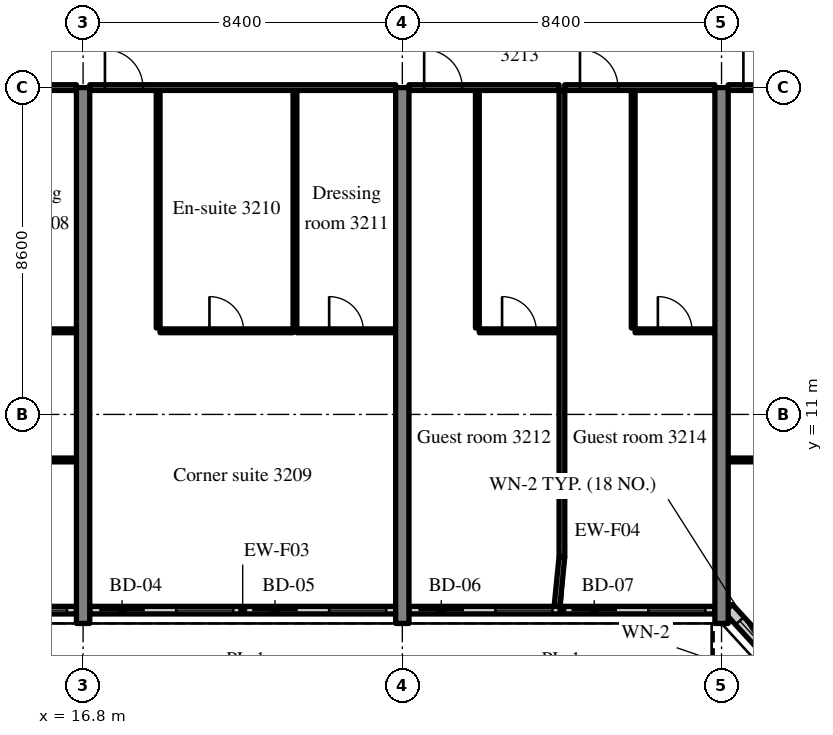
"""IFC4 building model, lengths in metres.
Left out: names, types, materials, properties, quantities, classifications, styles, units other than length and angle.
Written with IfcOpenShell. Run it as: python <this file> out.ifc"""

import sys

from ifc_helpers import new_model, si_unit, direction, frame, frame_2d, origin, place, context, subcontext, project, spatial, rectangle, extrude, source, transform, mapped, element, fill, save


model = new_model("IFC4")
c1 = context("Model", 3, precision=1e-05, world=origin(), true_north=direction((0.0, 1.0)))
c2 = subcontext(c1, "Body", "Model", "MODEL_VIEW")
j1 = project(units=[si_unit("LENGTHUNIT", "METRE"), si_unit("PLANEANGLEUNIT", "RADIAN")], contexts=[c1])
p1 = place(None, origin())
s1 = spatial("IfcSite", under=j1, at=p1, CompositionType="ELEMENT")
p2 = place(p1, origin())
s2 = spatial("IfcBuilding", under=s1, at=p2, CompositionType="ELEMENT")
p3 = place(p2, frame((0.0, 0.0, 133.2)))
s3 = spatial("IfcBuildingStorey", under=s2, at=p3, CompositionType="ELEMENT", Elevation=133.2)
m1 = source(origin(), c2, "Body", "SweptSolid", [
    extrude(rectangle(XDim=14.1, YDim=0.35, at=frame_2d((7.05, 0.0))), origin(), (0.0, 0.0, 1.0), 3.52),
])
for number, where, z_axis, x_axis in (
    (1, (16.8, 5.5, 0.0), (0.0, 0.0, 1.0), (0.0, 1.0, 0.0)),
    (2, (25.2, 5.5, 0.0), (0.0, 0.0, 1.0), (0.0, 1.0, 0.0)),
    (3, (33.6, 5.5, 0.0), (0.0, 0.0, 1.0), (0.0, 1.0, 0.0)),
):
    element("IfcWall", number, at=place(p3, frame(where, z_axis=z_axis, x_axis=x_axis)), inside=s3, PredefinedType="SHEAR", context=c2, shape_type="MappedRepresentation", body=[
        mapped(m1, transform((0.0, 0.0, 0.0), scale=1.0)),
    ])
m2 = source(origin(), c2, "Body", "SweptSolid", [
    extrude(rectangle(XDim=8.05, YDim=0.2, at=frame_2d((4.025, 0.0))), origin(), (0.0, 0.0, 1.0), 2.82),
])
p4 = place(p3, frame((8.575, 5.85, 0.0), z_axis=(0.0, 0.0, 1.0), x_axis=(1.0, 0.0, 0.0)))
e4 = element("IfcWall", 4, at=p4, inside=s3, PredefinedType="SOLIDWALL", context=c2, shape_type="MappedRepresentation", body=[
    mapped(m2, transform((0.0, 0.0, 0.0), scale=1.0)),
])
m3 = source(origin(), c2, "Body", "SweptSolid", [
    extrude(rectangle(XDim=1.2, YDim=2.4, at=frame_2d((0.6, 1.2))), frame((0.0, 0.11, 0.0), z_axis=(0.0, -1.0, 0.0), x_axis=(1.0, 0.0, 0.0)), (0.0, 0.0, 1.0), 0.22),
])
p5 = place(p4, frame((0.25, 0.0, 0.0)))
e5 = element("IfcOpeningElement", 5, at=p5, cuts=e4, PredefinedType="OPENING", context=c2, shape_type="MappedRepresentation", body=[
    mapped(m3, transform((0.0, 0.0, 0.0), scale=1.0)),
])
m4 = source(origin(), c2, "Body", "SweptSolid", [
    extrude(rectangle(XDim=1.5, YDim=1.5, at=frame_2d((0.75, 0.75))), frame((0.0, 0.11, 0.0), z_axis=(0.0, -1.0, 0.0), x_axis=(1.0, 0.0, 0.0)), (0.0, 0.0, 1.0), 0.22),
])
p6 = place(p4, frame((2.275, 0.0, 0.9)))
e6 = element("IfcOpeningElement", 6, at=p6, cuts=e4, PredefinedType="OPENING", context=c2, shape_type="MappedRepresentation", body=[
    mapped(m4, transform((0.0, 0.0, 0.0), scale=1.0)),
])
p7 = place(p4, frame((4.275, 0.0, 0.0)))
e7 = element("IfcOpeningElement", 7, at=p7, cuts=e4, PredefinedType="OPENING", context=c2, shape_type="MappedRepresentation", body=[
    mapped(m3, transform((0.0, 0.0, 0.0), scale=1.0)),
])
p8 = place(p4, frame((6.3, 0.0, 0.9)))
e8 = element("IfcOpeningElement", 8, at=p8, cuts=e4, PredefinedType="OPENING", context=c2, shape_type="MappedRepresentation", body=[
    mapped(m4, transform((0.0, 0.0, 0.0), scale=1.0)),
])
m5 = source(origin(), c2, "Body", "SweptSolid", [
    extrude(rectangle(XDim=8.05, YDim=0.2, at=frame_2d((4.025, 0.0))), origin(), (0.0, 0.0, 1.0), 2.82),
])
p9 = place(p3, frame((16.975, 5.85, 0.0), z_axis=(0.0, 0.0, 1.0), x_axis=(1.0, 0.0, 0.0)))
e9 = element("IfcWall", 9, at=p9, inside=s3, PredefinedType="SOLIDWALL", context=c2, shape_type="MappedRepresentation", body=[
    mapped(m5, transform((0.0, 0.0, 0.0), scale=1.0)),
])
p10 = place(p9, frame((0.25, 0.0, 0.0)))
e10 = element("IfcOpeningElement", 10, at=p10, cuts=e9, PredefinedType="OPENING", context=c2, shape_type="MappedRepresentation", body=[
    mapped(m3, transform((0.0, 0.0, 0.0), scale=1.0)),
])
p11 = place(p9, frame((2.275, 0.0, 0.9)))
e11 = element("IfcOpeningElement", 11, at=p11, cuts=e9, PredefinedType="OPENING", context=c2, shape_type="MappedRepresentation", body=[
    mapped(m4, transform((0.0, 0.0, 0.0), scale=1.0)),
])
p12 = place(p9, frame((4.275, 0.0, 0.0)))
e12 = element("IfcOpeningElement", 12, at=p12, cuts=e9, PredefinedType="OPENING", context=c2, shape_type="MappedRepresentation", body=[
    mapped(m3, transform((0.0, 0.0, 0.0), scale=1.0)),
])
p13 = place(p9, frame((6.3, 0.0, 0.9)))
e13 = element("IfcOpeningElement", 13, at=p13, cuts=e9, PredefinedType="OPENING", context=c2, shape_type="MappedRepresentation", body=[
    mapped(m4, transform((0.0, 0.0, 0.0), scale=1.0)),
])
p14 = place(p3, frame((25.375, 5.85, 0.0), z_axis=(0.0, 0.0, 1.0), x_axis=(1.0, 0.0, 0.0)))
e14 = element("IfcWall", 14, at=p14, inside=s3, PredefinedType="SOLIDWALL", context=c2, shape_type="MappedRepresentation", body=[
    mapped(m2, transform((0.0, 0.0, 0.0), scale=1.0)),
])
p15 = place(p14, frame((0.25, 0.0, 0.0)))
e15 = element("IfcOpeningElement", 15, at=p15, cuts=e14, PredefinedType="OPENING", context=c2, shape_type="MappedRepresentation", body=[
    mapped(m3, transform((0.0, 0.0, 0.0), scale=1.0)),
])
p16 = place(p14, frame((2.275, 0.0, 0.9)))
e16 = element("IfcOpeningElement", 16, at=p16, cuts=e14, PredefinedType="OPENING", context=c2, shape_type="MappedRepresentation", body=[
    mapped(m4, transform((0.0, 0.0, 0.0), scale=1.0)),
])
p17 = place(p14, frame((4.275, 0.0, 0.0)))
e17 = element("IfcOpeningElement", 17, at=p17, cuts=e14, PredefinedType="OPENING", context=c2, shape_type="MappedRepresentation", body=[
    mapped(m3, transform((0.0, 0.0, 0.0), scale=1.0)),
])
p18 = place(p14, frame((6.3, 0.0, 0.9)))
e18 = element("IfcOpeningElement", 18, at=p18, cuts=e14, PredefinedType="OPENING", context=c2, shape_type="MappedRepresentation", body=[
    mapped(m4, transform((0.0, 0.0, 0.0), scale=1.0)),
])
m6 = source(origin(), c2, "Body", "SweptSolid", [
    extrude(rectangle(XDim=2.398, YDim=0.3, at=frame_2d((1.199, 0.0))), origin(), (0.0, 0.0, 1.0), 3.52),
])
p19 = place(p3, frame((33.776, 5.9, 0.0), z_axis=(0.0, 0.0, 1.0), x_axis=(0.675374189419, -0.737475222815, 0.0)))
e19 = element("IfcWall", 19, at=p19, inside=s3, PredefinedType="SOLIDWALL", context=c2, shape_type="MappedRepresentation", body=[
    mapped(m6, transform((0.0, 0.0, 0.0), scale=1.0)),
])
m7 = source(origin(), c2, "Body", "SweptSolid", [
    extrude(rectangle(XDim=1.5, YDim=2.0, at=frame_2d((0.75, 1.0))), frame((0.0, 0.16, 0.0), z_axis=(0.0, -1.0, 0.0), x_axis=(1.0, 0.0, 0.0)), (0.0, 0.0, 1.0), 0.32),
])
p20 = place(p19, frame((0.449, 0.0, 0.9)))
e20 = element("IfcOpeningElement", 20, at=p20, cuts=e19, PredefinedType="OPENING", context=c2, shape_type="MappedRepresentation", body=[
    mapped(m7, transform((0.0, 0.0, 0.0), scale=1.0)),
])
m8 = source(origin(), c2, "Body", "SweptSolid", [
    extrude(rectangle(XDim=2.6, YDim=0.1, at=frame_2d((1.3, 0.0))), origin(), (0.0, 0.0, 1.0), 3.52),
])
p21 = place(p3, frame((14.025, 13.2, 0.0), z_axis=(0.0, 0.0, 1.0), x_axis=(1.0, 0.0, 0.0)))
e21 = element("IfcWall", 21, at=p21, inside=s3, PredefinedType="PARTITIONING", context=c2, shape_type="MappedRepresentation", body=[
    mapped(m8, transform((0.0, 0.0, 0.0), scale=1.0)),
])
m9 = source(origin(), c2, "Body", "SweptSolid", [
    extrude(rectangle(XDim=0.9, YDim=2.1, at=frame_2d((0.45, 1.05))), frame((0.0, 0.06, 0.0), z_axis=(0.0, -1.0, 0.0), x_axis=(1.0, 0.0, 0.0)), (0.0, 0.0, 1.0), 0.12),
])
p22 = place(p21, frame((0.85, 0.0, 0.0)))
e22 = element("IfcOpeningElement", 22, at=p22, cuts=e21, PredefinedType="OPENING", context=c2, shape_type="MappedRepresentation", body=[
    mapped(m9, transform((0.0, 0.0, 0.0), scale=1.0)),
])
m10 = source(origin(), c2, "Body", "SweptSolid", [
    extrude(rectangle(XDim=8.05, YDim=0.1, at=frame_2d((4.025, 0.0))), origin(), (0.0, 0.0, 1.0), 3.52),
])
p23 = place(p3, frame((8.575, 9.802, 0.0), z_axis=(0.0, 0.0, 1.0), x_axis=(1.0, 0.0, 0.0)))
e23 = element("IfcWall", 23, at=p23, inside=s3, PredefinedType="PARTITIONING", context=c2, shape_type="MappedRepresentation", body=[
    mapped(m10, transform((0.0, 0.0, 0.0), scale=1.0)),
])
m11 = source(origin(), c2, "Body", "SweptSolid", [
    extrude(rectangle(XDim=1.8, YDim=2.1, at=frame_2d((0.9, 1.05))), frame((0.0, 0.06, 0.0), z_axis=(0.0, -1.0, 0.0), x_axis=(1.0, 0.0, 0.0)), (0.0, 0.0, 1.0), 0.12),
])
p24 = place(p23, frame((3.125, 0.0, 0.0)))
e24 = element("IfcOpeningElement", 24, at=p24, cuts=e23, PredefinedType="OPENING", context=c2, shape_type="MappedRepresentation", body=[
    mapped(m11, transform((0.0, 0.0, 0.0), scale=1.0)),
])
m12 = source(origin(), c2, "Body", "SweptSolid", [
    extrude(rectangle(XDim=8.05, YDim=0.15, at=frame_2d((4.025, 0.0))), origin(), (0.0, 0.0, 1.0), 2.82),
])
p25 = place(p3, frame((8.575, 19.6, 0.0), z_axis=(0.0, 0.0, 1.0), x_axis=(1.0, 0.0, 0.0)))
e25 = element("IfcWall", 25, at=p25, inside=s3, PredefinedType="PARTITIONING", context=c2, shape_type="MappedRepresentation", body=[
    mapped(m12, transform((0.0, 0.0, 0.0), scale=1.0)),
])
m13 = source(origin(), c2, "Body", "SweptSolid", [
    extrude(rectangle(XDim=1.0, YDim=2.1, at=frame_2d((0.5, 1.05))), frame((0.0, 0.085, 0.0), z_axis=(0.0, -1.0, 0.0), x_axis=(1.0, 0.0, 0.0)), (0.0, 0.0, 1.0), 0.17),
])
p26 = place(p25, frame((0.4, 0.0, 0.0)))
e26 = element("IfcOpeningElement", 26, at=p26, cuts=e25, PredefinedType="OPENING", context=c2, shape_type="MappedRepresentation", body=[
    mapped(m13, transform((0.0, 0.0, 0.0), scale=1.0)),
])
m14 = source(origin(), c2, "Body", "SweptSolid", [
    extrude(rectangle(XDim=6.25, YDim=0.1, at=frame_2d((3.125, 0.0))), origin(), (0.0, 0.0, 1.0), 3.52),
])
for number, where, z_axis, x_axis in (
    (27, (18.775, 13.275, 0.0), (0.0, 0.0, 1.0), (0.0, 1.0, 0.0)),
    (28, (22.375, 13.275, 0.0), (0.0, 0.0, 1.0), (0.0, 1.0, 0.0)),
):
    element("IfcWall", number, at=place(p3, frame(where, z_axis=z_axis, x_axis=x_axis)), inside=s3, PredefinedType="PARTITIONING", context=c2, shape_type="MappedRepresentation", body=[
        mapped(m14, transform((0.0, 0.0, 0.0), scale=1.0)),
    ])
m15 = source(origin(), c2, "Body", "SweptSolid", [
    extrude(rectangle(XDim=3.5, YDim=0.1, at=frame_2d((1.75, 0.0))), origin(), (0.0, 0.0, 1.0), 3.52),
])
p27 = place(p3, frame((18.825, 13.2, 0.0), z_axis=(0.0, 0.0, 1.0), x_axis=(1.0, 0.0, 0.0)))
e29 = element("IfcWall", 29, at=p27, inside=s3, PredefinedType="PARTITIONING", context=c2, shape_type="MappedRepresentation", body=[
    mapped(m15, transform((0.0, 0.0, 0.0), scale=1.0)),
])
p28 = place(p27, frame((1.3, 0.0, 0.0)))
e30 = element("IfcOpeningElement", 30, at=p28, cuts=e29, PredefinedType="OPENING", context=c2, shape_type="MappedRepresentation", body=[
    mapped(m9, transform((0.0, 0.0, 0.0), scale=1.0)),
])
m16 = source(origin(), c2, "Body", "SweptSolid", [
    extrude(rectangle(XDim=2.6, YDim=0.1, at=frame_2d((1.3, 0.0))), origin(), (0.0, 0.0, 1.0), 3.52),
])
p29 = place(p3, frame((22.425, 13.2, 0.0), z_axis=(0.0, 0.0, 1.0), x_axis=(1.0, 0.0, 0.0)))
e31 = element("IfcWall", 31, at=p29, inside=s3, PredefinedType="PARTITIONING", context=c2, shape_type="MappedRepresentation", body=[
    mapped(m16, transform((0.0, 0.0, 0.0), scale=1.0)),
])
p30 = place(p29, frame((0.85, 0.0, 0.0)))
e32 = element("IfcOpeningElement", 32, at=p30, cuts=e31, PredefinedType="OPENING", context=c2, shape_type="MappedRepresentation", body=[
    mapped(m9, transform((0.0, 0.0, 0.0), scale=1.0)),
])
m17 = source(origin(), c2, "Body", "SweptSolid", [
    extrude(rectangle(XDim=8.05, YDim=0.15, at=frame_2d((4.025, 0.0))), origin(), (0.0, 0.0, 1.0), 2.82),
])
p31 = place(p3, frame((16.975, 19.6, 0.0), z_axis=(0.0, 0.0, 1.0), x_axis=(1.0, 0.0, 0.0)))
e33 = element("IfcWall", 33, at=p31, inside=s3, PredefinedType="PARTITIONING", context=c2, shape_type="MappedRepresentation", body=[
    mapped(m17, transform((0.0, 0.0, 0.0), scale=1.0)),
])
p32 = place(p31, frame((0.4, 0.0, 0.0)))
e34 = element("IfcOpeningElement", 34, at=p32, cuts=e33, PredefinedType="OPENING", context=c2, shape_type="MappedRepresentation", body=[
    mapped(m13, transform((0.0, 0.0, 0.0), scale=1.0)),
])
p33 = place(p3, frame((27.175, 13.275, 0.0), z_axis=(0.0, 0.0, 1.0), x_axis=(0.0, 1.0, 0.0)))
e35 = element("IfcWall", 35, at=p33, inside=s3, PredefinedType="PARTITIONING", context=c2, shape_type="MappedRepresentation", body=[
    mapped(m14, transform((0.0, 0.0, 0.0), scale=1.0)),
])
m18 = source(origin(), c2, "Body", "SweptSolid", [
    extrude(rectangle(XDim=2.1, YDim=0.1, at=frame_2d((1.05, 0.0))), origin(), (0.0, 0.0, 1.0), 3.52),
])
p34 = place(p3, frame((27.225, 13.2, 0.0), z_axis=(0.0, 0.0, 1.0), x_axis=(1.0, 0.0, 0.0)))
e36 = element("IfcWall", 36, at=p34, inside=s3, PredefinedType="PARTITIONING", context=c2, shape_type="MappedRepresentation", body=[
    mapped(m18, transform((0.0, 0.0, 0.0), scale=1.0)),
])
p35 = place(p34, frame((0.6, 0.0, 0.0)))
e37 = element("IfcOpeningElement", 37, at=p35, cuts=e36, PredefinedType="OPENING", context=c2, shape_type="MappedRepresentation", body=[
    mapped(m9, transform((0.0, 0.0, 0.0), scale=1.0)),
])
m19 = source(origin(), c2, "Body", "SweptSolid", [
    extrude(rectangle(XDim=3.95, YDim=0.15, at=frame_2d((1.975, 0.0))), origin(), (0.0, 0.0, 1.0), 2.82),
])
p36 = place(p3, frame((25.375, 19.6, 0.0), z_axis=(0.0, 0.0, 1.0), x_axis=(1.0, 0.0, 0.0)))
e38 = element("IfcWall", 38, at=p36, inside=s3, PredefinedType="PARTITIONING", context=c2, shape_type="MappedRepresentation", body=[
    mapped(m19, transform((0.0, 0.0, 0.0), scale=1.0)),
])
p37 = place(p36, frame((0.4, 0.0, 0.0)))
e39 = element("IfcOpeningElement", 39, at=p37, cuts=e38, PredefinedType="OPENING", context=c2, shape_type="MappedRepresentation", body=[
    mapped(m13, transform((0.0, 0.0, 0.0), scale=1.0)),
])
p38 = place(p3, frame((31.275, 13.275, 0.0), z_axis=(0.0, 0.0, 1.0), x_axis=(0.0, 1.0, 0.0)))
e40 = element("IfcWall", 40, at=p38, inside=s3, PredefinedType="PARTITIONING", context=c2, shape_type="MappedRepresentation", body=[
    mapped(m14, transform((0.0, 0.0, 0.0), scale=1.0)),
])
m20 = source(origin(), c2, "Body", "SweptSolid", [
    extrude(rectangle(XDim=2.1, YDim=0.1, at=frame_2d((1.05, 0.0))), origin(), (0.0, 0.0, 1.0), 3.52),
])
p39 = place(p3, frame((31.325, 13.2, 0.0), z_axis=(0.0, 0.0, 1.0), x_axis=(1.0, 0.0, 0.0)))
e41 = element("IfcWall", 41, at=p39, inside=s3, PredefinedType="PARTITIONING", context=c2, shape_type="MappedRepresentation", body=[
    mapped(m20, transform((0.0, 0.0, 0.0), scale=1.0)),
])
p40 = place(p39, frame((0.6, 0.0, 0.0)))
e42 = element("IfcOpeningElement", 42, at=p40, cuts=e41, PredefinedType="OPENING", context=c2, shape_type="MappedRepresentation", body=[
    mapped(m9, transform((0.0, 0.0, 0.0), scale=1.0)),
])
p41 = place(p3, frame((29.475, 19.6, 0.0), z_axis=(0.0, 0.0, 1.0), x_axis=(1.0, 0.0, 0.0)))
e43 = element("IfcWall", 43, at=p41, inside=s3, PredefinedType="PARTITIONING", context=c2, shape_type="MappedRepresentation", body=[
    mapped(m19, transform((0.0, 0.0, 0.0), scale=1.0)),
])
p42 = place(p41, frame((0.4, 0.0, 0.0)))
e44 = element("IfcOpeningElement", 44, at=p42, cuts=e43, PredefinedType="OPENING", context=c2, shape_type="MappedRepresentation", body=[
    mapped(m13, transform((0.0, 0.0, 0.0), scale=1.0)),
])
m21 = source(origin(), c2, "Body", "SweptSolid", [
    extrude(rectangle(XDim=12.275, YDim=0.15, at=frame_2d((6.137, 0.0))), origin(), (0.0, 0.0, 1.0), 3.52),
])
p43 = place(p3, frame((29.4, 7.25, 0.0), z_axis=(0.0, 0.0, 1.0), x_axis=(0.0, 1.0, 0.0)))
e45 = element("IfcWall", 45, at=p43, inside=s3, PredefinedType="PARTITIONING", context=c2, shape_type="MappedRepresentation", body=[
    mapped(m21, transform((0.0, 0.0, 0.0), scale=1.0)),
])
p44 = place(p3, frame((33.775, 9.802, 0.0), z_axis=(0.0, 0.0, 1.0), x_axis=(1.0, 0.0, 0.0)))
e46 = element("IfcWall", 46, at=p44, inside=s3, PredefinedType="PARTITIONING", context=c2, shape_type="MappedRepresentation", body=[
    mapped(m10, transform((0.0, 0.0, 0.0), scale=1.0)),
])
p45 = place(p44, frame((3.125, 0.0, 0.0)))
e47 = element("IfcOpeningElement", 47, at=p45, cuts=e46, PredefinedType="OPENING", context=c2, shape_type="MappedRepresentation", body=[
    mapped(m11, transform((0.0, 0.0, 0.0), scale=1.0)),
])
p46 = place(p3, frame((33.775, 19.6, 0.0), z_axis=(0.0, 0.0, 1.0), x_axis=(1.0, 0.0, 0.0)))
e48 = element("IfcWall", 48, at=p46, inside=s3, PredefinedType="PARTITIONING", context=c2, shape_type="MappedRepresentation", body=[
    mapped(m12, transform((0.0, 0.0, 0.0), scale=1.0)),
])
p47 = place(p46, frame((0.4, 0.0, 0.0)))
e49 = element("IfcOpeningElement", 49, at=p47, cuts=e48, PredefinedType="OPENING", context=c2, shape_type="MappedRepresentation", body=[
    mapped(m13, transform((0.0, 0.0, 0.0), scale=1.0)),
])
m22 = source(origin(), c2, "Body", "SweptSolid", [
    extrude(rectangle(XDim=1.307, YDim=0.15, at=frame_2d((0.653, 0.0))), origin(), (0.0, 0.0, 1.0), 3.52),
])
p48 = place(p3, frame((29.27, 5.95, 0.0), z_axis=(0.0, 0.0, 1.0), x_axis=(0.099411212066, 0.995046436562, 0.0)))
e50 = element("IfcWall", 50, at=p48, inside=s3, PredefinedType="PARTITIONING", context=c2, shape_type="MappedRepresentation", body=[
    mapped(m22, transform((0.0, 0.0, 0.0), scale=1.0)),
])
m23 = source(origin(), c2, "Body", "SweptSolid", [
    extrude(rectangle(XDim=1.5, YDim=1.5, at=frame_2d((0.75, 0.75))), frame((0.0, 0.03, 0.0), z_axis=(0.0, -1.0, 0.0), x_axis=(1.0, 0.0, 0.0)), (0.0, 0.0, 1.0), 0.06),
])
p49 = place(p8, origin())
e51 = element("IfcWindow", 51, at=p49, inside=s3, PartitioningType="SINGLE_PANEL", PredefinedType="WINDOW", context=c2, shape_type="MappedRepresentation", body=[
    mapped(m23, transform((0.0, 0.0, 0.0), scale=1.0)),
])
fill(e8, e51)
m24 = source(origin(), c2, "Body", "SweptSolid", [
    extrude(rectangle(XDim=1.2, YDim=2.4, at=frame_2d((0.6, 1.2))), frame((0.0, 0.025, 0.0), z_axis=(0.0, -1.0, 0.0), x_axis=(1.0, 0.0, 0.0)), (0.0, 0.0, 1.0), 0.05),
])
p50 = place(p10, origin())
e52 = element("IfcDoor", 52, at=p50, inside=s3, OperationType="SLIDING_TO_RIGHT", PredefinedType="DOOR", context=c2, shape_type="MappedRepresentation", body=[
    mapped(m24, transform((0.0, 0.0, 0.0), scale=1.0)),
])
fill(e10, e52)
p51 = place(p11, origin())
e53 = element("IfcWindow", 53, at=p51, inside=s3, PartitioningType="SINGLE_PANEL", PredefinedType="WINDOW", context=c2, shape_type="MappedRepresentation", body=[
    mapped(m23, transform((0.0, 0.0, 0.0), scale=1.0)),
])
fill(e11, e53)
p52 = place(p12, origin())
e54 = element("IfcDoor", 54, at=p52, inside=s3, OperationType="SLIDING_TO_LEFT", PredefinedType="DOOR", context=c2, shape_type="MappedRepresentation", body=[
    mapped(m24, transform((0.0, 0.0, 0.0), scale=1.0)),
])
fill(e12, e54)
p53 = place(p13, origin())
e55 = element("IfcWindow", 55, at=p53, inside=s3, PartitioningType="SINGLE_PANEL", PredefinedType="WINDOW", context=c2, shape_type="MappedRepresentation", body=[
    mapped(m23, transform((0.0, 0.0, 0.0), scale=1.0)),
])
fill(e13, e55)
p54 = place(p15, origin())
e56 = element("IfcDoor", 56, at=p54, inside=s3, OperationType="SLIDING_TO_RIGHT", PredefinedType="DOOR", context=c2, shape_type="MappedRepresentation", body=[
    mapped(m24, transform((0.0, 0.0, 0.0), scale=1.0)),
])
fill(e15, e56)
p55 = place(p16, origin())
e57 = element("IfcWindow", 57, at=p55, inside=s3, PartitioningType="SINGLE_PANEL", PredefinedType="WINDOW", context=c2, shape_type="MappedRepresentation", body=[
    mapped(m23, transform((0.0, 0.0, 0.0), scale=1.0)),
])
fill(e16, e57)
p56 = place(p17, origin())
e58 = element("IfcDoor", 58, at=p56, inside=s3, OperationType="SLIDING_TO_LEFT", PredefinedType="DOOR", context=c2, shape_type="MappedRepresentation", body=[
    mapped(m24, transform((0.0, 0.0, 0.0), scale=1.0)),
])
fill(e17, e58)
p57 = place(p18, origin())
e59 = element("IfcWindow", 59, at=p57, inside=s3, PartitioningType="SINGLE_PANEL", PredefinedType="WINDOW", context=c2, shape_type="MappedRepresentation", body=[
    mapped(m23, transform((0.0, 0.0, 0.0), scale=1.0)),
])
fill(e18, e59)
m25 = source(origin(), c2, "Body", "SweptSolid", [
    extrude(rectangle(XDim=1.5, YDim=2.0, at=frame_2d((0.75, 1.0))), frame((0.0, 0.03, 0.0), z_axis=(0.0, -1.0, 0.0), x_axis=(1.0, 0.0, 0.0)), (0.0, 0.0, 1.0), 0.06),
])
p58 = place(p20, origin())
e60 = element("IfcWindow", 60, at=p58, inside=s3, PartitioningType="SINGLE_PANEL", PredefinedType="WINDOW", context=c2, shape_type="MappedRepresentation", body=[
    mapped(m25, transform((0.0, 0.0, 0.0), scale=1.0)),
])
fill(e20, e60)
m26 = source(origin(), c2, "Body", "SweptSolid", [
    extrude(rectangle(XDim=0.9, YDim=2.1, at=frame_2d((0.45, 1.05))), frame((0.0, 0.025, 0.0), z_axis=(0.0, -1.0, 0.0), x_axis=(1.0, 0.0, 0.0)), (0.0, 0.0, 1.0), 0.05),
])
p59 = place(p28, origin())
e61 = element("IfcDoor", 61, at=p59, inside=s3, OperationType="SINGLE_SWING_LEFT", PredefinedType="DOOR", context=c2, shape_type="MappedRepresentation", body=[
    mapped(m26, transform((0.0, 0.0, 0.0), scale=1.0)),
])
fill(e30, e61)
p60 = place(p30, origin())
e62 = element("IfcDoor", 62, at=p60, inside=s3, OperationType="SINGLE_SWING_LEFT", PredefinedType="DOOR", context=c2, shape_type="MappedRepresentation", body=[
    mapped(m26, transform((0.0, 0.0, 0.0), scale=1.0)),
])
fill(e32, e62)
m27 = source(origin(), c2, "Body", "SweptSolid", [
    extrude(rectangle(XDim=1.0, YDim=2.1, at=frame_2d((0.5, 1.05))), frame((0.0, 0.025, 0.0), z_axis=(0.0, -1.0, 0.0), x_axis=(1.0, 0.0, 0.0)), (0.0, 0.0, 1.0), 0.05),
])
p61 = place(p32, origin())
e63 = element("IfcDoor", 63, at=p61, inside=s3, OperationType="SINGLE_SWING_LEFT", PredefinedType="DOOR", context=c2, shape_type="MappedRepresentation", body=[
    mapped(m27, transform((0.0, 0.0, 0.0), scale=1.0)),
])
fill(e34, e63)
p62 = place(p35, origin())
e64 = element("IfcDoor", 64, at=p62, inside=s3, OperationType="SINGLE_SWING_LEFT", PredefinedType="DOOR", context=c2, shape_type="MappedRepresentation", body=[
    mapped(m26, transform((0.0, 0.0, 0.0), scale=1.0)),
])
fill(e37, e64)
p63 = place(p37, origin())
e65 = element("IfcDoor", 65, at=p63, inside=s3, OperationType="SINGLE_SWING_LEFT", PredefinedType="DOOR", context=c2, shape_type="MappedRepresentation", body=[
    mapped(m27, transform((0.0, 0.0, 0.0), scale=1.0)),
])
fill(e39, e65)
p64 = place(p40, origin())
e66 = element("IfcDoor", 66, at=p64, inside=s3, OperationType="SINGLE_SWING_LEFT", PredefinedType="DOOR", context=c2, shape_type="MappedRepresentation", body=[
    mapped(m26, transform((0.0, 0.0, 0.0), scale=1.0)),
])
fill(e42, e66)
p65 = place(p42, origin())
e67 = element("IfcDoor", 67, at=p65, inside=s3, OperationType="SINGLE_SWING_LEFT", PredefinedType="DOOR", context=c2, shape_type="MappedRepresentation", body=[
    mapped(m27, transform((0.0, 0.0, 0.0), scale=1.0)),
])
fill(e44, e67)
p66 = place(p47, origin())
e68 = element("IfcDoor", 68, at=p66, inside=s3, OperationType="SINGLE_SWING_LEFT", PredefinedType="DOOR", context=c2, shape_type="MappedRepresentation", body=[
    mapped(m27, transform((0.0, 0.0, 0.0), scale=1.0)),
])
fill(e49, e68)
save(model, sys.argv[1])
